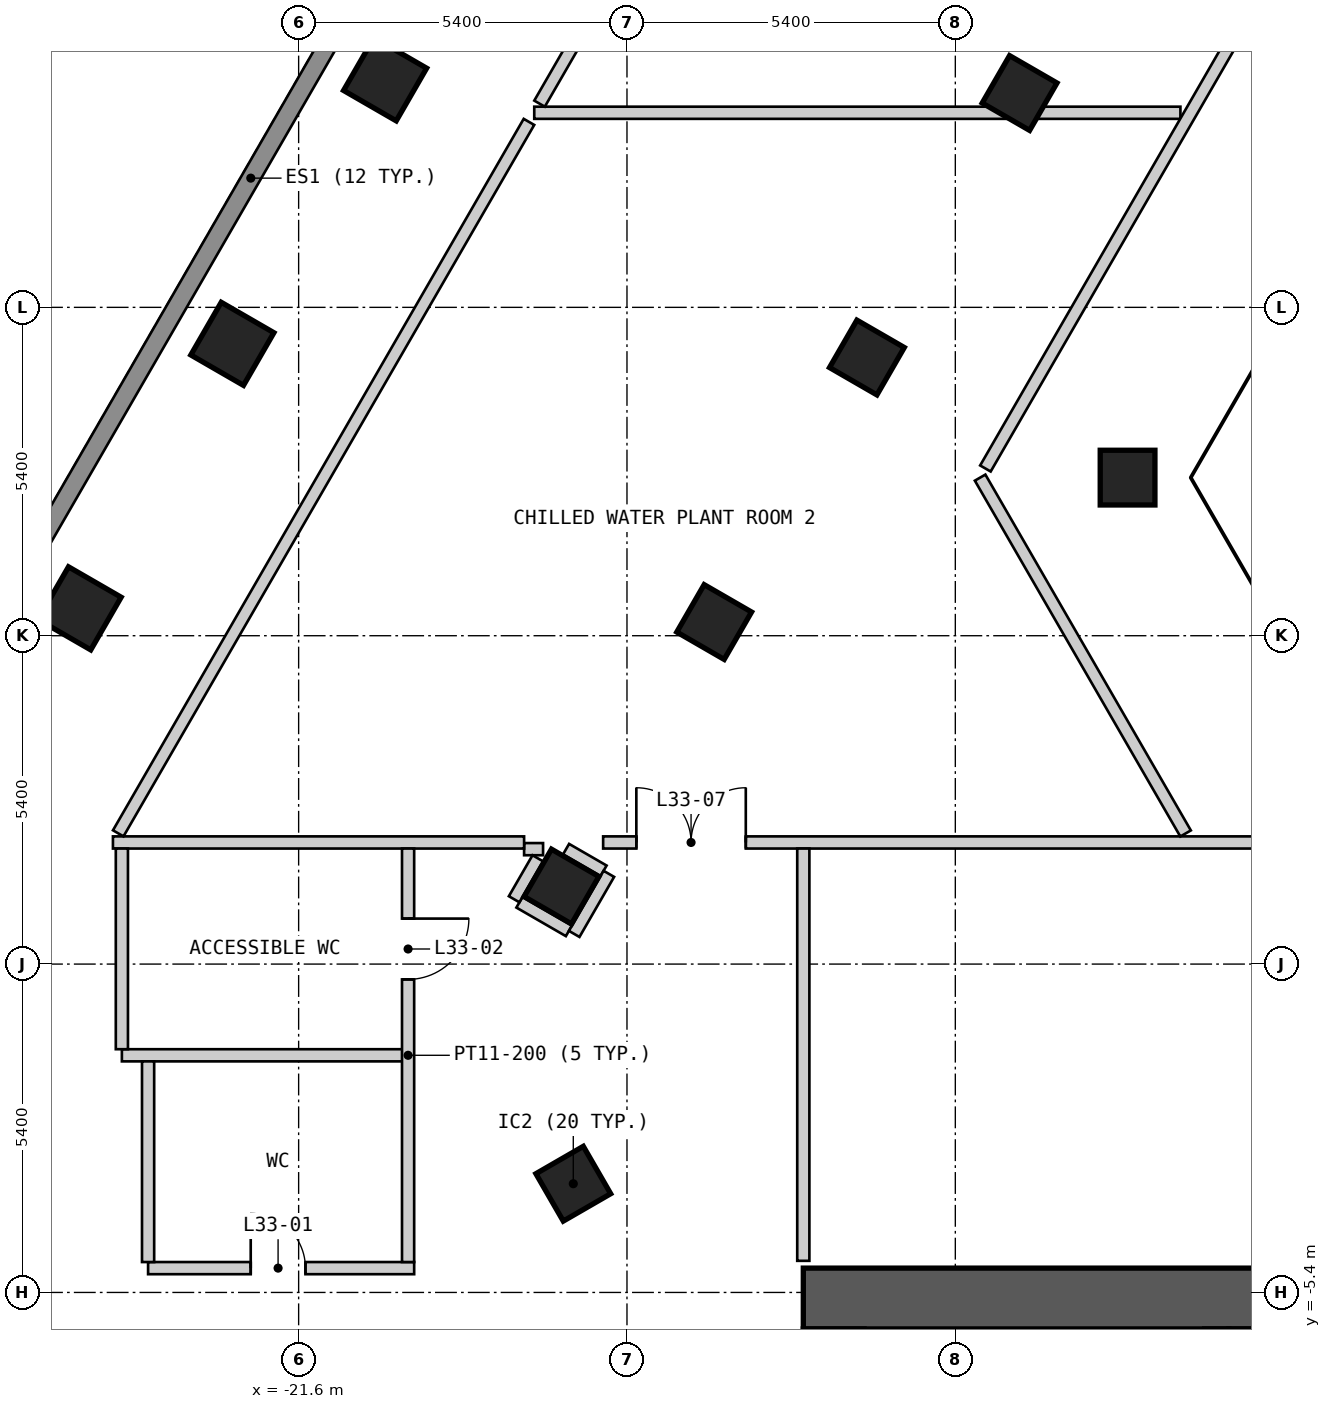
"""IFC4 building model, lengths in metres.
Left out: names, types, materials, properties, quantities, classifications, styles, units other than length and angle.
Written with IfcOpenShell. Run it as: python <this file> out.ifc"""

import sys

from ifc_helpers import new_model, si_unit, direction, frame, frame_2d, origin, origin_2d, place, context, subcontext, project, spatial, polyline, rectangle, outline, extrude, element, fill, save


model = new_model("IFC4")
c1 = context("Model", 3, precision=1e-05, world=origin(), true_north=direction((0.0, 1.0)))
c2 = subcontext(c1, "Body", "Model", "MODEL_VIEW")
j1 = project(units=[si_unit("LENGTHUNIT", "METRE"), si_unit("PLANEANGLEUNIT", "RADIAN")], contexts=[c1])
p1 = place(None, origin())
s1 = spatial("IfcSite", under=j1, at=p1, CompositionType="ELEMENT")
p2 = place(p1, origin())
s2 = spatial("IfcBuilding", under=s1, at=p2, CompositionType="ELEMENT")
p3 = place(p2, frame((0.0, 0.0, 108.0)))
s3 = spatial("IfcBuildingStorey", under=s2, at=p3, CompositionType="ELEMENT", Elevation=108.0)
for number, where, z_axis, x_axis in (
    (1, (-20.178, 14.55, 0.0), (0.0, 0.0, 1.0), (-0.5, -0.866, 0.0)),
    (2, (-22.69, 10.2, 0.0), (0.0, 0.0, 1.0), (-0.5, -0.866, 0.0)),
):
    element("IfcColumn", number, at=place(p3, frame(where, z_axis=z_axis, x_axis=x_axis)), inside=s3, PredefinedType="COLUMN", context=c2, shape_type="SweptSolid", body=[
        extrude(rectangle(XDim=1.0, YDim=1.0, at=origin_2d()), origin(), (0.0, 0.0, 1.0), 2.6),
    ])
p4 = place(p3, frame((-25.202, 5.85, 0.0), z_axis=(0.0, 0.0, 1.0), x_axis=(-0.5, -0.866025403784, 0.0)))
e3 = element("IfcColumn", 3, at=p4, inside=s3, PredefinedType="COLUMN", context=c2, shape_type="SweptSolid", body=[
    extrude(rectangle(XDim=1.0, YDim=1.0, at=origin_2d()), origin(), (0.0, 0.0, 1.0), 3.6),
])
for number, where, z_axis, x_axis in (
    (4, (-17.083, -3.612, 0.0), (0.0, 0.0, 1.0), (0.5, -0.866, 0.0)),
    (5, (-9.743, 14.325, 0.0), (0.0, 0.0, 1.0), (-0.5, -0.866, 0.0)),
    (6, (-7.967, 8.0, 0.0), (0.0, 0.0, 1.0), (1.0, 0.0, 0.0)),
):
    element("IfcColumn", number, at=place(p3, frame(where, z_axis=z_axis, x_axis=x_axis)), inside=s3, PredefinedType="COLUMN", context=c2, shape_type="SweptSolid", body=[
        extrude(rectangle(XDim=0.9, YDim=0.9, at=origin_2d()), origin(), (0.0, 0.0, 1.0), 3.6),
    ])
for number, where, z_axis, x_axis in (
    (7, (-12.254, 9.975, 0.0), (0.0, 0.0, 1.0), (-0.5, -0.866, 0.0)),
    (8, (-14.766, 5.625, 0.0), (0.0, 0.0, 1.0), (-0.5, -0.866, 0.0)),
):
    element("IfcColumn", number, at=place(p3, frame(where, z_axis=z_axis, x_axis=x_axis)), inside=s3, PredefinedType="COLUMN", context=c2, shape_type="SweptSolid", body=[
        extrude(rectangle(XDim=0.9, YDim=0.9, at=origin_2d()), origin(), (0.0, 0.0, 1.0), 2.6),
    ])
p5 = place(p3, frame((-17.277, 1.275, 0.0), z_axis=(0.0, 0.0, 1.0), x_axis=(-0.5, -0.866025403784, 0.0)))
e9 = element("IfcColumn", 9, at=p5, inside=s3, PredefinedType="COLUMN", context=c2, shape_type="SweptSolid", body=[
    extrude(rectangle(XDim=0.9, YDim=0.9, at=origin_2d()), origin(), (0.0, 0.0, 1.0), 3.6),
])
p6 = place(p3, frame((-13.3, -5.5, 0.0), z_axis=(0.0, 0.0, 1.0), x_axis=(1.0, 0.0, 0.0)))
e10 = element("IfcWall", 10, at=p6, inside=s3, PredefinedType="SHEAR", context=c2, shape_type="SweptSolid", body=[
    extrude(rectangle(XDim=26.6, YDim=1.0, at=frame_2d((13.3, 0.0))), origin(), (0.0, 0.0, 1.0), 2.6),
])
p7 = place(p6, frame((23.65, 0.0, 0.0)))
e11 = element("IfcOpeningElement", 11, at=p7, cuts=e10, PredefinedType="OPENING", context=c2, shape_type="SweptSolid", body=[
    extrude(rectangle(XDim=1.2, YDim=2.1, at=frame_2d((0.6, 1.05))), frame((0.0, 0.51, 0.0), z_axis=(0.0, -1.0, 0.0), x_axis=(1.0, 0.0, 0.0)), (0.0, 0.0, 1.0), 1.02),
])
p8 = place(p3, frame((-15.747, 24.425, 0.0), z_axis=(0.0, 0.0, 1.0), x_axis=(-0.500027479704, -0.866009537788, 0.0)))
e12 = element("IfcWall", 12, at=p8, inside=s3, PredefinedType="SOLIDWALL", context=c2, shape_type="SweptSolid", body=[
    extrude(outline(polyline([(0.0, -0.15), (26.559, -0.15), (26.478, 0.15), (0.08, 0.15), (0.0, -0.15)])), origin(), (0.0, 0.0, 1.0), 2.6),
])
p9 = place(p3, frame((-29.027, -3.425, 0.0), z_axis=(0.0, 0.0, 1.0), x_axis=(0.500035407905, -0.866004960056, 0.0)))
e13 = element("IfcWall", 13, at=p9, inside=s3, PredefinedType="SOLIDWALL", context=c2, shape_type="SweptSolid", body=[
    extrude(outline(polyline([(0.0, -0.15), (23.094, -0.15), (23.014, 0.15), (0.08, 0.15), (0.0, -0.15)])), origin(), (0.0, 0.0, 1.0), 2.6),
])
p10 = place(p3, frame((-24.076, -5.0, 0.0), z_axis=(0.0, 0.0, 1.0), x_axis=(1.0, 0.0, 0.0)))
e14 = element("IfcWall", 14, at=p10, inside=s3, PredefinedType="PARTITIONING", context=c2, shape_type="SweptSolid", body=[
    extrude(rectangle(XDim=4.376, YDim=0.2, at=frame_2d((2.188, 0.0))), origin(), (0.0, 0.0, 1.0), 2.6),
])
p11 = place(p10, frame((1.688, 0.0, 0.0)))
e15 = element("IfcOpeningElement", 15, at=p11, cuts=e14, PredefinedType="OPENING", context=c2, shape_type="SweptSolid", body=[
    extrude(rectangle(XDim=0.9, YDim=2.1, at=frame_2d((0.45, 1.05))), frame((0.0, 0.11, 0.0), z_axis=(0.0, -1.0, 0.0), x_axis=(1.0, 0.0, 0.0)), (0.0, 0.0, 1.0), 0.22),
])
p12 = place(p3, frame((-24.507, -1.5, 0.0), z_axis=(0.0, 0.0, 1.0), x_axis=(1.0, 0.0, 0.0)))
e16 = element("IfcWall", 16, at=p12, inside=s3, PredefinedType="PARTITIONING", context=c2, shape_type="SweptSolid", body=[
    extrude(rectangle(XDim=4.707, YDim=0.2, at=frame_2d((2.354, 0.0))), origin(), (0.0, 0.0, 1.0), 2.6),
])
p13 = place(p3, frame((-17.892, 1.89, 0.0), z_axis=(0.0, 0.0, 1.0), x_axis=(1.0, 0.0, 0.0)))
e17 = element("IfcWall", 17, at=p13, inside=s3, PredefinedType="SOLIDWALL", context=c2, shape_type="SweptSolid", body=[
    extrude(rectangle(XDim=0.312, YDim=0.2, at=frame_2d((0.156, 0.0))), origin(), (0.0, 0.0, 1.0), 2.6),
])
p14 = place(p3, frame((-24.654, 2.0, 0.0), z_axis=(0.0, 0.0, 1.0), x_axis=(1.0, 0.0, 0.0)))
e18 = element("IfcWall", 18, at=p14, inside=s3, PredefinedType="SOLIDWALL", context=c2, shape_type="SweptSolid", body=[
    extrude(rectangle(XDim=6.762, YDim=0.2, at=frame_2d((3.381, 0.0))), origin(), (0.0, 0.0, 1.0), 2.6),
])
p15 = place(p3, frame((-16.592, 2.0, 0.0), z_axis=(0.0, 0.0, 1.0), x_axis=(1.0, 0.0, 0.0)))
e19 = element("IfcWall", 19, at=p15, inside=s3, PredefinedType="SOLIDWALL", context=c2, shape_type="SweptSolid", body=[
    extrude(rectangle(XDim=40.676, YDim=0.2, at=frame_2d((20.338, 0.0))), origin(), (0.0, 0.0, 1.0), 2.6),
])
p16 = place(p15, frame((0.546, 0.0, 0.0)))
e20 = element("IfcOpeningElement", 20, at=p16, cuts=e19, PredefinedType="OPENING", context=c2, shape_type="SweptSolid", body=[
    extrude(rectangle(XDim=1.8, YDim=2.1, at=frame_2d((0.9, 1.05))), frame((0.0, 0.11, 0.0), z_axis=(0.0, -1.0, 0.0), x_axis=(1.0, 0.0, 0.0)), (0.0, 0.0, 1.0), 0.22),
])
p17 = place(p15, frame((30.492, 0.0, 0.0)))
e21 = element("IfcOpeningElement", 21, at=p17, cuts=e19, PredefinedType="OPENING", context=c2, shape_type="SweptSolid", body=[
    extrude(rectangle(XDim=1.0, YDim=2.1, at=frame_2d((0.5, 1.05))), frame((0.0, 0.11, 0.0), z_axis=(0.0, -1.0, 0.0), x_axis=(1.0, 0.0, 0.0)), (0.0, 0.0, 1.0), 0.22),
])
p18 = place(p15, frame((21.179, 0.0, 0.0)))
e22 = element("IfcOpeningElement", 22, at=p18, cuts=e19, PredefinedType="OPENING", context=c2, shape_type="SweptSolid", body=[
    extrude(rectangle(XDim=1.8, YDim=2.1, at=frame_2d((0.9, 1.05))), frame((0.0, 0.11, 0.0), z_axis=(0.0, -1.0, 0.0), x_axis=(1.0, 0.0, 0.0)), (0.0, 0.0, 1.0), 0.22),
])
p19 = place(p3, frame((-17.725, 14.0, 0.0), z_axis=(0.0, 0.0, 1.0), x_axis=(1.0, 0.0, 0.0)))
e23 = element("IfcWall", 23, at=p19, inside=s3, PredefinedType="SOLIDWALL", context=c2, shape_type="SweptSolid", body=[
    extrude(rectangle(XDim=10.627, YDim=0.2, at=frame_2d((5.313, 0.0))), origin(), (0.0, 0.0, 1.0), 2.6),
])
for number, where, z_axis, x_axis in (
    (24, (-24.507, -1.4, 0.0), (0.0, 0.0, 1.0), (0.0, 1.0, 0.0)),
    (25, (-24.076, -4.9, 0.0), (0.0, 0.0, 1.0), (0.0, 1.0, 0.0)),
):
    element("IfcWall", number, at=place(p3, frame(where, z_axis=z_axis, x_axis=x_axis)), inside=s3, PredefinedType="PARTITIONING", context=c2, shape_type="SweptSolid", body=[
        extrude(rectangle(XDim=3.3, YDim=0.2, at=frame_2d((1.65, 0.0))), origin(), (0.0, 0.0, 1.0), 2.6),
    ])
p20 = place(p3, frame((-19.8, -4.9, 0.0), z_axis=(0.0, 0.0, 1.0), x_axis=(0.0, 1.0, 0.0)))
e26 = element("IfcWall", 26, at=p20, inside=s3, PredefinedType="PARTITIONING", context=c2, shape_type="SweptSolid", body=[
    extrude(rectangle(XDim=6.8, YDim=0.2, at=frame_2d((3.4, 0.0))), origin(), (0.0, 0.0, 1.0), 2.6),
])
p21 = place(p20, frame((4.648, 0.0, 0.0)))
e27 = element("IfcOpeningElement", 27, at=p21, cuts=e26, PredefinedType="OPENING", context=c2, shape_type="SweptSolid", body=[
    extrude(rectangle(XDim=1.0, YDim=2.1, at=frame_2d((0.5, 1.05))), frame((0.0, 0.11, 0.0), z_axis=(0.0, -1.0, 0.0), x_axis=(1.0, 0.0, 0.0)), (0.0, 0.0, 1.0), 0.22),
])
p22 = place(p3, frame((-13.3, -4.88, 0.0), z_axis=(0.0, 0.0, 1.0), x_axis=(0.0, 1.0, 0.0)))
e28 = element("IfcWall", 28, at=p22, inside=s3, PredefinedType="PARTITIONING", context=c2, shape_type="SweptSolid", body=[
    extrude(rectangle(XDim=6.78, YDim=0.2, at=frame_2d((3.39, 0.0))), origin(), (0.0, 0.0, 1.0), 2.6),
])
p23 = place(p3, frame((-17.202, 1.89, 0.0), z_axis=(0.0, 0.0, 1.0), x_axis=(0.866168466286, -0.499752126571, 0.0)))
e29 = element("IfcWall", 29, at=p23, inside=s3, PredefinedType="SOLIDWALL", context=c2, shape_type="SweptSolid", body=[
    extrude(rectangle(XDim=0.712, YDim=0.2, at=frame_2d((0.356, 0.0))), origin(), (0.0, 0.0, 1.0), 2.6),
])
p24 = place(p3, frame((-17.969, 1.016, 0.0), z_axis=(0.0, 0.0, 1.0), x_axis=(0.865900072007, -0.500217018202, 0.0)))
e30 = element("IfcWall", 30, at=p24, inside=s3, PredefinedType="SOLIDWALL", context=c2, shape_type="SweptSolid", body=[
    extrude(rectangle(XDim=0.94, YDim=0.2, at=frame_2d((0.47, 0.0))), origin(), (0.0, 0.0, 1.0), 2.6),
])
p25 = place(p3, frame((-10.392, 8.0, 0.0), z_axis=(0.0, 0.0, 1.0), x_axis=(0.500051862572, -0.865995458844, 0.0)))
e31 = element("IfcWall", 31, at=p25, inside=s3, PredefinedType="SOLIDWALL", context=c2, shape_type="SweptSolid", body=[
    extrude(rectangle(XDim=6.758, YDim=0.2, at=frame_2d((3.379, 0.0))), origin(), (0.0, 0.0, 1.0), 2.6),
])
p26 = place(p3, frame((-10.305, 8.15, 0.0), z_axis=(0.0, 0.0, 1.0), x_axis=(0.499918809126, 0.866072274283, 0.0)))
e32 = element("IfcWall", 32, at=p26, inside=s3, PredefinedType="SOLIDWALL", context=c2, shape_type="SweptSolid", body=[
    extrude(rectangle(XDim=10.046, YDim=0.2, at=frame_2d((5.023, 0.0))), origin(), (0.0, 0.0, 1.0), 2.6),
])
p27 = place(p3, frame((-18.056, 1.066, 0.0), z_axis=(0.0, 0.0, 1.0), x_axis=(0.499749611789, 0.866169917231, 0.0)))
e33 = element("IfcWall", 33, at=p27, inside=s3, PredefinedType="SOLIDWALL", context=c2, shape_type="SweptSolid", body=[
    extrude(rectangle(XDim=0.778, YDim=0.2, at=frame_2d((0.389, 0.0))), origin(), (0.0, 0.0, 1.0), 2.6),
])
p28 = place(p3, frame((-24.567, 2.15, 0.0), z_axis=(0.0, 0.0, 1.0), x_axis=(0.499987337164, 0.866032714553, 0.0)))
e34 = element("IfcWall", 34, at=p28, inside=s3, PredefinedType="SOLIDWALL", context=c2, shape_type="SweptSolid", body=[
    extrude(rectangle(XDim=13.51, YDim=0.2, at=frame_2d((6.755, 0.0))), origin(), (0.0, 0.0, 1.0), 2.6),
])
p29 = place(p3, frame((-17.638, 14.15, 0.0), z_axis=(0.0, 0.0, 1.0), x_axis=(0.499951396692, 0.866053463099, 0.0)))
e35 = element("IfcWall", 35, at=p29, inside=s3, PredefinedType="SOLIDWALL", context=c2, shape_type="SweptSolid", body=[
    extrude(rectangle(XDim=8.492, YDim=0.2, at=frame_2d((4.246, 0.0))), origin(), (0.0, 0.0, 1.0), 2.6),
])
p30 = place(p3, frame((-17.068, 0.496, 0.0), z_axis=(0.0, 0.0, 1.0), x_axis=(0.499845994177, 0.866114300832, 0.0)))
e36 = element("IfcWall", 36, at=p30, inside=s3, PredefinedType="SOLIDWALL", context=c2, shape_type="SweptSolid", body=[
    extrude(rectangle(XDim=1.14, YDim=0.2, at=frame_2d((0.57, 0.0))), origin(), (0.0, 0.0, 1.0), 2.6),
])
p31 = place(p11, origin())
e37 = element("IfcDoor", 37, at=p31, inside=s3, OperationType="SINGLE_SWING_LEFT", PredefinedType="DOOR", context=c2, shape_type="SweptSolid", body=[
    extrude(rectangle(XDim=0.9, YDim=2.1, at=frame_2d((0.45, 1.05))), frame((0.0, 0.025, 0.0), z_axis=(0.0, -1.0, 0.0), x_axis=(1.0, 0.0, 0.0)), (0.0, 0.0, 1.0), 0.05),
])
fill(e15, e37)
p32 = place(p21, origin())
e38 = element("IfcDoor", 38, at=p32, inside=s3, OperationType="SINGLE_SWING_RIGHT", PredefinedType="DOOR", context=c2, shape_type="SweptSolid", body=[
    extrude(rectangle(XDim=1.0, YDim=2.1, at=frame_2d((0.5, 1.05))), frame((0.0, 0.025, 0.0), z_axis=(0.0, -1.0, 0.0), x_axis=(1.0, 0.0, 0.0)), (0.0, 0.0, 1.0), 0.05),
])
fill(e27, e38)
p33 = place(p16, origin())
e39 = element("IfcDoor", 39, at=p33, inside=s3, OperationType="DOUBLE_DOOR_SINGLE_SWING", PredefinedType="DOOR", context=c2, shape_type="SweptSolid", body=[
    extrude(rectangle(XDim=1.8, YDim=2.1, at=frame_2d((0.9, 1.05))), frame((0.0, 0.025, 0.0), z_axis=(0.0, -1.0, 0.0), x_axis=(1.0, 0.0, 0.0)), (0.0, 0.0, 1.0), 0.05),
])
fill(e20, e39)
save(model, sys.argv[1])
